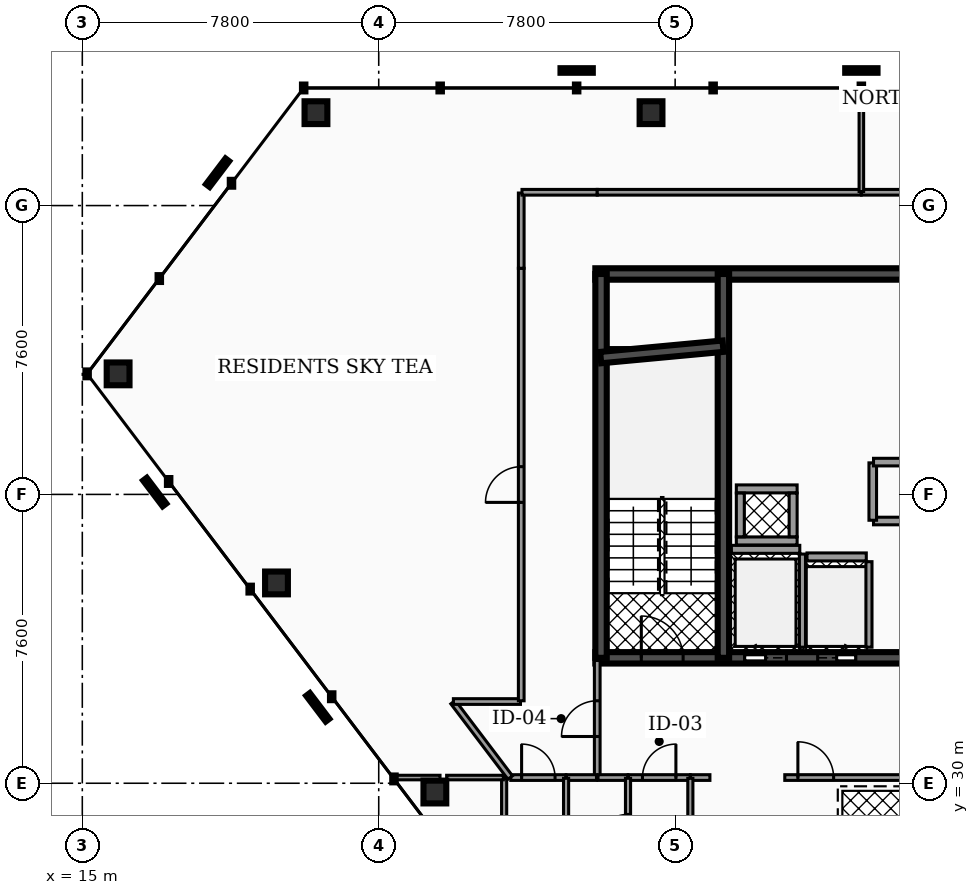
"""IFC4 building model, lengths in metres.
Left out: names, types, materials, properties, quantities, classifications, styles, units other than length and angle.
Written with IfcOpenShell. Run it as: python <this file> out.ifc"""

import sys

from ifc_helpers import new_model, si_unit, direction, frame, frame_2d, origin, origin_2d, place, context, subcontext, project, spatial, rectangle, hollow_rectangle, extrude, element, fill, save


model = new_model("IFC4")
c1 = context("Model", 3, precision=1e-05, world=origin(), true_north=direction((0.0, 1.0)))
c2 = subcontext(c1, "Body", "Model", "MODEL_VIEW")
j1 = project(units=[si_unit("LENGTHUNIT", "METRE"), si_unit("PLANEANGLEUNIT", "RADIAN")], contexts=[c1])
p1 = place(None, origin())
s1 = spatial("IfcSite", under=j1, at=p1, CompositionType="ELEMENT")
p2 = place(p1, origin())
s2 = spatial("IfcBuilding", under=s1, at=p2, CompositionType="ELEMENT")
p3 = place(p2, frame((0.0, 0.0, 225.76)))
s3 = spatial("IfcBuildingStorey", under=s2, at=p3, CompositionType="ELEMENT", Elevation=225.76)
p4 = place(p3, frame((28.5, 43.4, 0.0), z_axis=(0.0, 0.0, 1.0), x_axis=(1.0, 0.0, 0.0)))
e1 = element("IfcWall", 1, at=p4, inside=s3, PredefinedType="SHEAR", context=c2, shape_type="SweptSolid", body=[
    extrude(rectangle(XDim=19.86, YDim=0.3, at=frame_2d((9.93, 0.0))), origin(), (0.0, 0.0, 1.0), 3.18),
])
p5 = place(p3, frame((28.5, 33.3, 0.0), z_axis=(0.0, 0.0, 1.0), x_axis=(1.0, 0.0, 0.0)))
e2 = element("IfcWall", 2, at=p5, inside=s3, PredefinedType="SHEAR", context=c2, shape_type="SweptSolid", body=[
    extrude(rectangle(XDim=19.86, YDim=0.3, at=frame_2d((9.93, 0.0))), origin(), (0.0, 0.0, 1.0), 3.18),
])
p6 = place(p5, frame((3.93, 0.0, 0.0)))
e3 = element("IfcOpeningElement", 3, at=p6, cuts=e2, PredefinedType="OPENING", context=c2, shape_type="SweptSolid", body=[
    extrude(rectangle(XDim=1.1, YDim=2.15, at=frame_2d((0.55, 1.075))), frame((0.0, 0.16, 0.0), z_axis=(0.0, -1.0, 0.0), x_axis=(1.0, 0.0, 0.0)), (0.0, 0.0, 1.0), 0.32),
])
p7 = place(p5, frame((14.77, 0.0, 0.0)))
e4 = element("IfcOpeningElement", 4, at=p7, cuts=e2, PredefinedType="OPENING", context=c2, shape_type="SweptSolid", body=[
    extrude(rectangle(XDim=1.1, YDim=2.15, at=frame_2d((0.55, 1.075))), frame((0.0, 0.16, 0.0), z_axis=(0.0, -1.0, 0.0), x_axis=(1.0, 0.0, 0.0)), (0.0, 0.0, 1.0), 0.32),
])
p8 = place(p5, frame((11.25, 0.0, 0.0)))
e5 = element("IfcOpeningElement", 5, at=p8, cuts=e2, PredefinedType="OPENING", context=c2, shape_type="SweptSolid", body=[
    extrude(rectangle(XDim=1.0, YDim=2.1, at=frame_2d((0.5, 1.05))), frame((0.0, 0.16, 0.0), z_axis=(0.0, -1.0, 0.0), x_axis=(1.0, 0.0, 0.0)), (0.0, 0.0, 1.0), 0.32),
])
p9 = place(p5, frame((12.95, 0.0, 0.0)))
e6 = element("IfcOpeningElement", 6, at=p9, cuts=e2, PredefinedType="OPENING", context=c2, shape_type="SweptSolid", body=[
    extrude(rectangle(XDim=1.0, YDim=2.1, at=frame_2d((0.5, 1.05))), frame((0.0, 0.16, 0.0), z_axis=(0.0, -1.0, 0.0), x_axis=(1.0, 0.0, 0.0)), (0.0, 0.0, 1.0), 0.32),
])
p10 = place(p5, frame((5.85, 0.0, 0.0)))
e7 = element("IfcOpeningElement", 7, at=p10, cuts=e2, PredefinedType="OPENING", context=c2, shape_type="SweptSolid", body=[
    extrude(rectangle(XDim=1.0, YDim=2.1, at=frame_2d((0.5, 1.05))), frame((0.0, 0.16, 0.0), z_axis=(0.0, -1.0, 0.0), x_axis=(1.0, 0.0, 0.0)), (0.0, 0.0, 1.0), 0.32),
])
p11 = place(p5, frame((1.21, 0.0, 0.0)))
e8 = element("IfcOpeningElement", 8, at=p11, cuts=e2, PredefinedType="OPENING", context=c2, shape_type="SweptSolid", body=[
    extrude(rectangle(XDim=1.1, YDim=2.2, at=frame_2d((0.55, 1.1))), frame((0.0, 0.16, 0.0), z_axis=(0.0, -1.0, 0.0), x_axis=(1.0, 0.0, 0.0)), (0.0, 0.0, 1.0), 0.32),
])
p12 = place(p5, frame((9.34, 0.0, 0.0)))
e9 = element("IfcOpeningElement", 9, at=p12, cuts=e2, PredefinedType="OPENING", context=c2, shape_type="SweptSolid", body=[
    extrude(rectangle(XDim=1.12, YDim=2.05, at=frame_2d((0.56, 1.025))), frame((0.0, 0.16, 0.0), z_axis=(0.0, -1.0, 0.0), x_axis=(1.0, 0.0, 0.0)), (0.0, 0.0, 1.0), 0.32),
])
p13 = place(p5, frame((17.55, 0.0, 0.0)))
e10 = element("IfcOpeningElement", 10, at=p13, cuts=e2, PredefinedType="OPENING", context=c2, shape_type="SweptSolid", body=[
    extrude(rectangle(XDim=1.1, YDim=2.2, at=frame_2d((0.55, 1.1))), frame((0.0, 0.16, 0.0), z_axis=(0.0, -1.0, 0.0), x_axis=(1.0, 0.0, 0.0)), (0.0, 0.0, 1.0), 0.32),
])
for number, where, z_axis, x_axis in (
    (11, (28.65, 33.3, 0.0), (0.0, 0.0, 1.0), (0.0, 1.0, 0.0)),
    (12, (31.87, 33.3, 0.0), (0.0, 0.0, 1.0), (0.0, 1.0, 0.0)),
):
    element("IfcWall", number, at=place(p3, frame(where, z_axis=z_axis, x_axis=x_axis)), inside=s3, PredefinedType="SHEAR", context=c2, shape_type="SweptSolid", body=[
        extrude(rectangle(XDim=10.1, YDim=0.3, at=frame_2d((5.05, 0.0))), origin(), (0.0, 0.0, 1.0), 3.18),
    ])
p14 = place(p3, frame((28.64, 41.2, 0.0), z_axis=(0.0, 0.0, 1.0), x_axis=(0.995687118776, 0.092774789157, 0.0)))
e13 = element("IfcWall", 13, at=p14, inside=s3, PredefinedType="SHEAR", context=c2, shape_type="SweptSolid", body=[
    extrude(rectangle(XDim=3.234, YDim=0.3, at=frame_2d((1.617, 0.0))), origin(), (0.0, 0.0, 1.0), 3.18),
])
p15 = place(p3, frame((29.966, 47.644, 0.0), z_axis=(-0.036649433498, -0.036572761043, 0.99865872658), x_axis=(0.706365967986, -0.707846819072, 0.0)))
e14 = element("IfcColumn", 14, at=p15, inside=s3, PredefinedType="COLUMN", context=c2, shape_type="SweptSolid", body=[
    extrude(hollow_rectangle(XDim=0.6, YDim=0.6, WallThickness=0.03, at=origin_2d()), origin(), (0.0, 0.0, 1.0), 3.184),
])
p16 = place(p3, frame((21.148, 47.644, 0.0), z_axis=(-0.067058934383, -0.036514967695, 0.997080616828), x_axis=(0.478219820724, -0.878240173908, 0.0)))
e15 = element("IfcColumn", 15, at=p16, inside=s3, PredefinedType="COLUMN", context=c2, shape_type="SweptSolid", body=[
    extrude(hollow_rectangle(XDim=0.6, YDim=0.6, WallThickness=0.03, at=origin_2d()), origin(), (0.0, 0.0, 1.0), 3.189),
])
p17 = place(p3, frame((15.942, 40.772, 0.0), z_axis=(0.057471887016, 0.127487241437, 0.990173714796), x_axis=(-0.911646666715, 0.410974883743, 0.0)))
e16 = element("IfcColumn", 16, at=p17, inside=s3, PredefinedType="COLUMN", context=c2, shape_type="SweptSolid", body=[
    extrude(hollow_rectangle(XDim=0.6, YDim=0.6, WallThickness=0.03, at=origin_2d()), origin(), (0.0, 0.0, 1.0), 3.211),
])
p18 = place(p3, frame((20.11, 35.271, 0.0), z_axis=(0.068873578437, 0.11263303435, 0.991246805678), x_axis=(-0.853139309653, 0.521683158943, 0.0)))
e17 = element("IfcColumn", 17, at=p18, inside=s3, PredefinedType="COLUMN", context=c2, shape_type="SweptSolid", body=[
    extrude(hollow_rectangle(XDim=0.6, YDim=0.6, WallThickness=0.03, at=origin_2d()), origin(), (0.0, 0.0, 1.0), 3.208),
])
p19 = place(p3, frame((24.278, 29.769, 0.0), z_axis=(0.080271085663, 0.097787546482, 0.991964791996), x_axis=(-0.772937109765, 0.634482643063, 0.0)))
e18 = element("IfcColumn", 18, at=p19, inside=s3, PredefinedType="COLUMN", context=c2, shape_type="SweptSolid", body=[
    extrude(hollow_rectangle(XDim=0.6, YDim=0.6, WallThickness=0.03, at=origin_2d()), origin(), (0.0, 0.0, 1.0), 3.206),
])
p20 = place(p3, frame((32.08, 36.155, 0.0), z_axis=(0.0, 0.0, 1.0), x_axis=(1.0, 0.0, 0.0)))
e19 = element("IfcWall", 19, at=p20, inside=s3, PredefinedType="SOLIDWALL", context=c2, shape_type="SweptSolid", body=[
    extrude(rectangle(XDim=1.8, YDim=0.21, at=frame_2d((0.9, 0.0))), origin(), (0.0, 0.0, 1.0), 3.18),
])
p21 = place(p3, frame((33.95, 33.58, 0.0), z_axis=(0.0, 0.0, 1.0), x_axis=(0.0, 1.0, 0.0)))
e20 = element("IfcWall", 20, at=p21, inside=s3, PredefinedType="SOLIDWALL", context=c2, shape_type="SweptSolid", body=[
    extrude(rectangle(XDim=2.45, YDim=0.16, at=frame_2d((1.225, 0.0))), origin(), (0.0, 0.0, 1.0), 3.18),
])
p22 = place(p3, frame((34.07, 35.955, 0.0), z_axis=(0.0, 0.0, 1.0), x_axis=(1.0, 0.0, 0.0)))
e21 = element("IfcWall", 21, at=p22, inside=s3, PredefinedType="SOLIDWALL", context=c2, shape_type="SweptSolid", body=[
    extrude(rectangle(XDim=1.56, YDim=0.21, at=frame_2d((0.78, 0.0))), origin(), (0.0, 0.0, 1.0), 3.18),
])
p23 = place(p3, frame((35.7, 33.58, 0.0), z_axis=(0.0, 0.0, 1.0), x_axis=(0.0, 1.0, 0.0)))
e22 = element("IfcWall", 22, at=p23, inside=s3, PredefinedType="SOLIDWALL", context=c2, shape_type="SweptSolid", body=[
    extrude(rectangle(XDim=2.25, YDim=0.16, at=frame_2d((1.125, 0.0))), origin(), (0.0, 0.0, 1.0), 3.18),
])
for number, where, z_axis, x_axis in (
    (23, (32.21, 36.375, 0.0), (0.0, 0.0, 1.0), (1.0, 0.0, 0.0)),
    (24, (32.21, 37.745, 0.0), (0.0, 0.0, 1.0), (1.0, 0.0, 0.0)),
):
    element("IfcWall", number, at=place(p3, frame(where, z_axis=z_axis, x_axis=x_axis)), inside=s3, PredefinedType="SOLIDWALL", context=c2, shape_type="SweptSolid", body=[
        extrude(rectangle(XDim=1.6, YDim=0.21, at=frame_2d((0.8, 0.0))), origin(), (0.0, 0.0, 1.0), 3.18),
    ])
for number, where, z_axis, x_axis in (
    (25, (32.315, 36.485, 0.0), (0.0, 0.0, 1.0), (0.0, 1.0, 0.0)),
    (26, (33.705, 36.485, 0.0), (0.0, 0.0, 1.0), (0.0, 1.0, 0.0)),
):
    element("IfcWall", number, at=place(p3, frame(where, z_axis=z_axis, x_axis=x_axis)), inside=s3, PredefinedType="SOLIDWALL", context=c2, shape_type="SweptSolid", body=[
        extrude(rectangle(XDim=1.15, YDim=0.21, at=frame_2d((0.575, 0.0))), origin(), (0.0, 0.0, 1.0), 3.18),
    ])
p24 = place(p3, frame((35.82, 36.9, 0.0), z_axis=(0.0, 0.0, 1.0), x_axis=(1.0, 0.0, 0.0)))
e27 = element("IfcWall", 27, at=p24, inside=s3, PredefinedType="PARTITIONING", context=c2, shape_type="SweptSolid", body=[
    extrude(rectangle(XDim=1.71, YDim=0.2, at=frame_2d((0.855, 0.0))), origin(), (0.0, 0.0, 1.0), 2.235),
])
p25 = place(p3, frame((35.8, 36.92, 0.0), z_axis=(0.0, 0.0, 1.0), x_axis=(0.0, 1.0, 0.0)))
e28 = element("IfcWall", 28, at=p25, inside=s3, PredefinedType="PARTITIONING", context=c2, shape_type="SweptSolid", body=[
    extrude(rectangle(XDim=1.51, YDim=0.2, at=frame_2d((0.755, 0.0))), origin(), (0.0, 0.0, 1.0), 2.235),
])
p26 = place(p3, frame((35.82, 38.45, 0.0), z_axis=(0.0, 0.0, 1.0), x_axis=(1.0, 0.0, 0.0)))
e29 = element("IfcWall", 29, at=p26, inside=s3, PredefinedType="PARTITIONING", context=c2, shape_type="SweptSolid", body=[
    extrude(rectangle(XDim=1.71, YDim=0.2, at=frame_2d((0.855, 0.0))), origin(), (0.0, 0.0, 1.0), 2.235),
])
p27 = place(p3, frame((28.55, 30.17, 0.0), z_axis=(0.0, 0.0, 1.0), x_axis=(0.0, 1.0, 0.0)))
e30 = element("IfcWall", 30, at=p27, inside=s3, PredefinedType="PARTITIONING", context=c2, shape_type="SweptSolid", body=[
    extrude(rectangle(XDim=3.06, YDim=0.15, at=frame_2d((1.53, 0.0))), origin(), (0.0, 0.0, 1.0), 2.235),
])
p28 = place(p27, frame((1.06, 0.0, 0.0)))
e31 = element("IfcOpeningElement", 31, at=p28, cuts=e30, PredefinedType="OPENING", context=c2, shape_type="SweptSolid", body=[
    extrude(rectangle(XDim=0.94, YDim=2.05, at=frame_2d((0.47, 1.025))), frame((0.0, 0.085, 0.0), z_axis=(0.0, -1.0, 0.0), x_axis=(1.0, 0.0, 0.0)), (0.0, 0.0, 1.0), 0.17),
])
p29 = place(p3, frame((29.365, 30.15, 0.0), z_axis=(0.0, 0.0, 1.0), x_axis=(1.0, 0.0, 0.0)))
e32 = element("IfcWall", 32, at=p29, inside=s3, PredefinedType="PARTITIONING", context=c2, shape_type="SweptSolid", body=[
    extrude(rectangle(XDim=1.63, YDim=0.15, at=frame_2d((0.815, 0.0))), origin(), (0.0, 0.0, 1.0), 2.235),
])
p30 = place(p29, frame((0.375, 0.0, 0.0)))
e33 = element("IfcOpeningElement", 33, at=p30, cuts=e32, PredefinedType="OPENING", context=c2, shape_type="SweptSolid", body=[
    extrude(rectangle(XDim=0.88, YDim=2.05, at=frame_2d((0.44, 1.025))), frame((0.0, 0.085, 0.0), z_axis=(0.0, -1.0, 0.0), x_axis=(1.0, 0.0, 0.0)), (0.0, 0.0, 1.0), 0.17),
])
p31 = place(p3, frame((28.57, 30.15, 0.0), z_axis=(0.0, 0.0, 1.0), x_axis=(1.0, 0.0, 0.0)))
e34 = element("IfcWall", 34, at=p31, inside=s3, PredefinedType="PARTITIONING", context=c2, shape_type="SweptSolid", body=[
    extrude(rectangle(XDim=0.785, YDim=0.15, at=frame_2d((0.393, 0.0))), origin(), (0.0, 0.0, 1.0), 2.235),
])
p32 = place(p3, frame((33.485, 30.15, 0.0), z_axis=(0.0, 0.0, 1.0), x_axis=(1.0, 0.0, 0.0)))
e35 = element("IfcWall", 35, at=p32, inside=s3, PredefinedType="PARTITIONING", context=c2, shape_type="SweptSolid", body=[
    extrude(rectangle(XDim=8.03, YDim=0.15, at=frame_2d((4.015, 0.0))), origin(), (0.0, 0.0, 1.0), 2.235),
])
p33 = place(p32, frame((0.345, 0.0, 0.0)))
e36 = element("IfcOpeningElement", 36, at=p33, cuts=e35, PredefinedType="OPENING", context=c2, shape_type="SweptSolid", body=[
    extrude(rectangle(XDim=0.94, YDim=2.05, at=frame_2d((0.47, 1.025))), frame((0.0, 0.085, 0.0), z_axis=(0.0, -1.0, 0.0), x_axis=(1.0, 0.0, 0.0)), (0.0, 0.0, 1.0), 0.17),
])
p34 = place(p3, frame((31.005, 30.15, 0.0), z_axis=(0.0, 0.0, 1.0), x_axis=(1.0, 0.0, 0.0)))
e37 = element("IfcWall", 37, at=p34, inside=s3, PredefinedType="PARTITIONING", context=c2, shape_type="SweptSolid", body=[
    extrude(rectangle(XDim=0.51, YDim=0.15, at=frame_2d((0.255, 0.0))), origin(), (0.0, 0.0, 1.0), 2.235),
])
p35 = place(p3, frame((26.275, 30.15, 0.0), z_axis=(0.0, 0.0, 1.0), x_axis=(1.0, 0.0, 0.0)))
e38 = element("IfcWall", 38, at=p35, inside=s3, PredefinedType="PARTITIONING", context=c2, shape_type="SweptSolid", body=[
    extrude(rectangle(XDim=1.45, YDim=0.15, at=frame_2d((0.725, 0.0))), origin(), (0.0, 0.0, 1.0), 2.235),
])
p36 = place(p35, frame((0.285, 0.0, 0.0)))
e39 = element("IfcOpeningElement", 39, at=p36, cuts=e38, PredefinedType="OPENING", context=c2, shape_type="SweptSolid", body=[
    extrude(rectangle(XDim=0.88, YDim=2.05, at=frame_2d((0.44, 1.025))), frame((0.0, 0.085, 0.0), z_axis=(0.0, -1.0, 0.0), x_axis=(1.0, 0.0, 0.0)), (0.0, 0.0, 1.0), 0.17),
])
p37 = place(p3, frame((27.735, 30.15, 0.0), z_axis=(0.0, 0.0, 1.0), x_axis=(1.0, 0.0, 0.0)))
e40 = element("IfcWall", 40, at=p37, inside=s3, PredefinedType="PARTITIONING", context=c2, shape_type="SweptSolid", body=[
    extrude(rectangle(XDim=0.795, YDim=0.15, at=frame_2d((0.397, 0.0))), origin(), (0.0, 0.0, 1.0), 2.235),
])
p38 = place(p3, frame((24.757, 32.134, 0.0), z_axis=(0.0, 0.0, 1.0), x_axis=(0.603806698968, -0.797130773638, 0.0)))
e41 = element("IfcWall", 41, at=p38, inside=s3, PredefinedType="PARTITIONING", context=c2, shape_type="SweptSolid", body=[
    extrude(rectangle(XDim=2.489, YDim=0.15, at=frame_2d((1.245, 0.0))), origin(), (0.0, 0.0, 1.0), 2.235),
])
p39 = place(p3, frame((24.765, 32.15, 0.0), z_axis=(0.0, 0.0, 1.0), x_axis=(1.0, 0.0, 0.0)))
e42 = element("IfcWall", 42, at=p39, inside=s3, PredefinedType="PARTITIONING", context=c2, shape_type="SweptSolid", body=[
    extrude(rectangle(XDim=1.765, YDim=0.15, at=frame_2d((0.883, 0.0))), origin(), (0.0, 0.0, 1.0), 2.235),
])
p40 = place(p3, frame((26.55, 32.17, 0.0), z_axis=(0.0, 0.0, 1.0), x_axis=(0.0, 1.0, 0.0)))
e43 = element("IfcWall", 43, at=p40, inside=s3, PredefinedType="PARTITIONING", context=c2, shape_type="SweptSolid", body=[
    extrude(rectangle(XDim=11.38, YDim=0.15, at=frame_2d((5.69, 0.0))), origin(), (0.0, 0.0, 1.0), 2.235),
])
p41 = place(p40, frame((5.22, 0.0, 0.0)))
e44 = element("IfcOpeningElement", 44, at=p41, cuts=e43, PredefinedType="OPENING", context=c2, shape_type="SweptSolid", body=[
    extrude(rectangle(XDim=0.94, YDim=2.05, at=frame_2d((0.47, 1.025))), frame((0.0, 0.085, 0.0), z_axis=(0.0, -1.0, 0.0), x_axis=(1.0, 0.0, 0.0)), (0.0, 0.0, 1.0), 0.17),
])
for number, where, z_axis, x_axis in (
    (45, (26.55, 43.55, 0.0), (0.0, 0.0, 1.0), (0.0, 1.0, 0.0)),
    (46, (26.57, 45.55, 0.0), (0.0, 0.0, 1.0), (1.0, 0.0, 0.0)),
):
    element("IfcWall", number, at=place(p3, frame(where, z_axis=z_axis, x_axis=x_axis)), inside=s3, PredefinedType="PARTITIONING", context=c2, shape_type="SweptSolid", body=[
        extrude(rectangle(XDim=1.98, YDim=0.15, at=frame_2d((0.99, 0.0))), origin(), (0.0, 0.0, 1.0), 2.235),
    ])
p42 = place(p3, frame((28.55, 45.55, 0.0), z_axis=(0.0, 0.0, 1.0), x_axis=(1.0, 0.0, 0.0)))
e47 = element("IfcWall", 47, at=p42, inside=s3, PredefinedType="PARTITIONING", context=c2, shape_type="SweptSolid", body=[
    extrude(rectangle(XDim=6.945, YDim=0.15, at=frame_2d((3.473, 0.0))), origin(), (0.0, 0.0, 1.0), 2.235),
])
p43 = place(p3, frame((35.505, 45.55, 0.0), z_axis=(0.0, 0.0, 1.0), x_axis=(1.0, 0.0, 0.0)))
e48 = element("IfcWall", 48, at=p43, inside=s3, PredefinedType="PARTITIONING", context=c2, shape_type="SweptSolid", body=[
    extrude(rectangle(XDim=6.345, YDim=0.15, at=frame_2d((3.173, 0.0))), origin(), (0.0, 0.0, 1.0), 2.235),
])
p44 = place(p3, frame((29.36, 27.37, 0.0), z_axis=(0.0, 0.0, 1.0), x_axis=(0.0, 1.0, 0.0)))
e49 = element("IfcWall", 49, at=p44, inside=s3, PredefinedType="PARTITIONING", context=c2, shape_type="SweptSolid", body=[
    extrude(rectangle(XDim=2.76, YDim=0.135, at=frame_2d((1.38, 0.0))), origin(), (0.0, 0.0, 1.0), 2.235),
])
p45 = place(p44, frame((0.95, 0.0, 0.0)))
e50 = element("IfcOpeningElement", 50, at=p45, cuts=e49, PredefinedType="OPENING", context=c2, shape_type="SweptSolid", body=[
    extrude(rectangle(XDim=0.86, YDim=2.05, at=frame_2d((0.43, 1.025))), frame((0.0, 0.077, 0.0), z_axis=(0.0, -1.0, 0.0), x_axis=(1.0, 0.0, 0.0)), (0.0, 0.0, 1.0), 0.155),
])
for number, where, z_axis, x_axis in (
    (51, (31.0, 27.37, 0.0), (0.0, 0.0, 1.0), (0.0, 1.0, 0.0)),
    (52, (27.73, 27.37, 0.0), (0.0, 0.0, 1.0), (0.0, 1.0, 0.0)),
    (53, (26.1, 27.37, 0.0), (0.0, 0.0, 1.0), (0.0, 1.0, 0.0)),
):
    element("IfcWall", number, at=place(p3, frame(where, z_axis=z_axis, x_axis=x_axis)), inside=s3, PredefinedType="PARTITIONING", context=c2, shape_type="SweptSolid", body=[
        extrude(rectangle(XDim=2.76, YDim=0.135, at=frame_2d((1.38, 0.0))), origin(), (0.0, 0.0, 1.0), 2.235),
    ])
p46 = place(p3, frame((23.189, 30.15, 0.0), z_axis=(0.0, 0.0, 1.0), x_axis=(1.0, 0.0, 0.0)))
e54 = element("IfcWall", 54, at=p46, inside=s3, PredefinedType="PARTITIONING", context=c2, shape_type="SweptSolid", body=[
    extrude(rectangle(XDim=1.224, YDim=0.12, at=frame_2d((0.612, 0.0))), origin(), (0.0, 0.0, 1.0), 2.235),
])
p47 = place(p3, frame((24.587, 30.15, 0.0), z_axis=(0.0, 0.0, 1.0), x_axis=(1.0, 0.0, 0.0)))
e55 = element("IfcWall", 55, at=p47, inside=s3, PredefinedType="PARTITIONING", context=c2, shape_type="SweptSolid", body=[
    extrude(rectangle(XDim=1.493, YDim=0.12, at=frame_2d((0.747, 0.0))), origin(), (0.0, 0.0, 1.0), 2.235),
])
p48 = place(p3, frame((35.5, 45.57, 0.0), z_axis=(0.0, 0.0, 1.0), x_axis=(0.0, 1.0, 0.0)))
e56 = element("IfcWall", 56, at=p48, inside=s3, PredefinedType="PARTITIONING", context=c2, shape_type="SweptSolid", body=[
    extrude(rectangle(XDim=2.709, YDim=0.12, at=frame_2d((1.354, 0.0))), origin(), (0.0, 0.0, 1.0), 2.235),
])
p49 = place(p6, origin())
e57 = element("IfcDoor", 57, at=p49, inside=s3, OperationType="SLIDING_TO_LEFT", PredefinedType="DOOR", context=c2, shape_type="SweptSolid", body=[
    extrude(rectangle(XDim=1.1, YDim=2.15, at=frame_2d((0.55, 1.075))), frame((0.0, 0.025, 0.0), z_axis=(0.0, -1.0, 0.0), x_axis=(1.0, 0.0, 0.0)), (0.0, 0.0, 1.0), 0.05),
])
fill(e3, e57)
p50 = place(p10, origin())
e58 = element("IfcDoor", 58, at=p50, inside=s3, OperationType="SLIDING_TO_RIGHT", PredefinedType="DOOR", context=c2, shape_type="SweptSolid", body=[
    extrude(rectangle(XDim=1.0, YDim=2.1, at=frame_2d((0.5, 1.05))), frame((0.0, 0.025, 0.0), z_axis=(0.0, -1.0, 0.0), x_axis=(1.0, 0.0, 0.0)), (0.0, 0.0, 1.0), 0.05),
])
fill(e7, e58)
p51 = place(p11, origin())
e59 = element("IfcDoor", 59, at=p51, inside=s3, OperationType="SINGLE_SWING_LEFT", PredefinedType="DOOR", context=c2, shape_type="SweptSolid", body=[
    extrude(rectangle(XDim=1.1, YDim=2.2, at=frame_2d((0.55, 1.1))), frame((0.0, 0.025, 0.0), z_axis=(0.0, -1.0, 0.0), x_axis=(1.0, 0.0, 0.0)), (0.0, 0.0, 1.0), 0.05),
])
fill(e8, e59)
p52 = place(p28, origin())
e60 = element("IfcDoor", 60, at=p52, inside=s3, OperationType="SINGLE_SWING_LEFT", PredefinedType="DOOR", context=c2, shape_type="SweptSolid", body=[
    extrude(rectangle(XDim=0.94, YDim=2.05, at=frame_2d((0.47, 1.025))), frame((0.0, 0.025, 0.0), z_axis=(0.0, -1.0, 0.0), x_axis=(1.0, 0.0, 0.0)), (0.0, 0.0, 1.0), 0.05),
])
fill(e31, e60)
p53 = place(p30, origin())
e61 = element("IfcDoor", 61, at=p53, inside=s3, OperationType="SINGLE_SWING_RIGHT", PredefinedType="DOOR", context=c2, shape_type="SweptSolid", body=[
    extrude(rectangle(XDim=0.88, YDim=2.05, at=frame_2d((0.44, 1.025))), frame((0.0, 0.025, 0.0), z_axis=(0.0, -1.0, 0.0), x_axis=(1.0, 0.0, 0.0)), (0.0, 0.0, 1.0), 0.05),
])
fill(e33, e61)
p54 = place(p33, origin())
e62 = element("IfcDoor", 62, at=p54, inside=s3, OperationType="SINGLE_SWING_LEFT", PredefinedType="DOOR", context=c2, shape_type="SweptSolid", body=[
    extrude(rectangle(XDim=0.94, YDim=2.05, at=frame_2d((0.47, 1.025))), frame((0.0, 0.025, 0.0), z_axis=(0.0, -1.0, 0.0), x_axis=(1.0, 0.0, 0.0)), (0.0, 0.0, 1.0), 0.05),
])
fill(e36, e62)
p55 = place(p36, origin())
e63 = element("IfcDoor", 63, at=p55, inside=s3, OperationType="SINGLE_SWING_LEFT", PredefinedType="DOOR", context=c2, shape_type="SweptSolid", body=[
    extrude(rectangle(XDim=0.88, YDim=2.05, at=frame_2d((0.44, 1.025))), frame((0.0, 0.025, 0.0), z_axis=(0.0, -1.0, 0.0), x_axis=(1.0, 0.0, 0.0)), (0.0, 0.0, 1.0), 0.05),
])
fill(e39, e63)
p56 = place(p41, origin())
e64 = element("IfcDoor", 64, at=p56, inside=s3, OperationType="SINGLE_SWING_LEFT", PredefinedType="DOOR", context=c2, shape_type="SweptSolid", body=[
    extrude(rectangle(XDim=0.94, YDim=2.05, at=frame_2d((0.47, 1.025))), frame((0.0, 0.025, 0.0), z_axis=(0.0, -1.0, 0.0), x_axis=(1.0, 0.0, 0.0)), (0.0, 0.0, 1.0), 0.05),
])
fill(e44, e64)
p57 = place(p45, origin())
e65 = element("IfcDoor", 65, at=p57, inside=s3, OperationType="SINGLE_SWING_LEFT", PredefinedType="DOOR", context=c2, shape_type="SweptSolid", body=[
    extrude(rectangle(XDim=0.86, YDim=2.05, at=frame_2d((0.43, 1.025))), frame((0.0, 0.025, 0.0), z_axis=(0.0, -1.0, 0.0), x_axis=(1.0, 0.0, 0.0)), (0.0, 0.0, 1.0), 0.05),
])
fill(e50, e65)
save(model, sys.argv[1])
